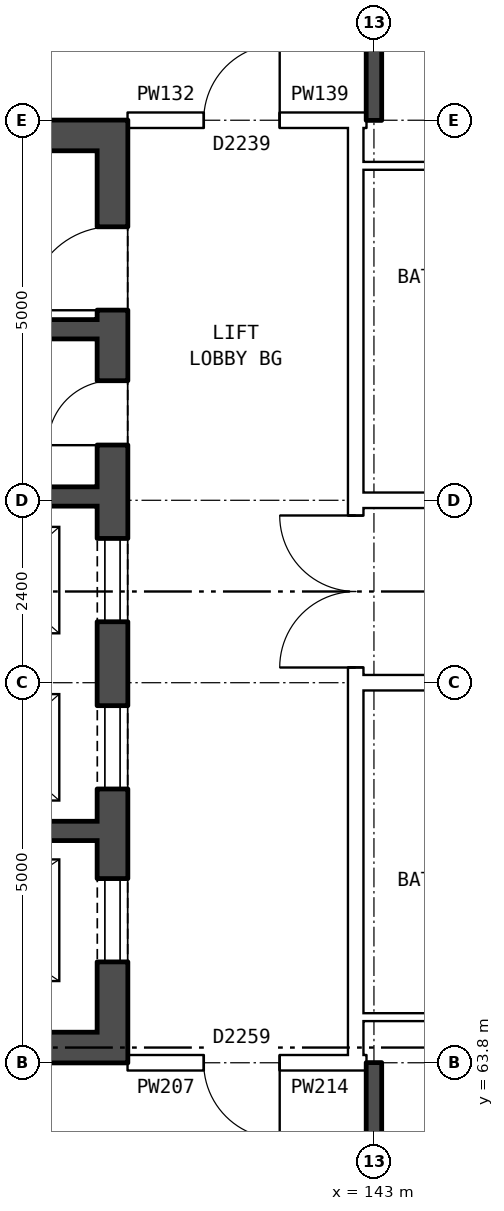
"""IFC4 building model, lengths in metres.
Left out: names, types, materials, properties, quantities, classifications, styles, units other than length and angle.
Written with IfcOpenShell. Run it as: python <this file> out.ifc"""

import sys

from ifc_helpers import new_model, si_unit, direction, frame, frame_2d, origin, place, context, subcontext, project, spatial, rectangle, extrude, element, fill, save


model = new_model("IFC4")
c1 = context("Model", 3, precision=1e-05, world=origin(), true_north=direction((0.0, 1.0)))
c2 = subcontext(c1, "Body", "Model", "MODEL_VIEW")
j1 = project(units=[si_unit("LENGTHUNIT", "METRE"), si_unit("PLANEANGLEUNIT", "RADIAN")], contexts=[c1])
p1 = place(None, origin())
s1 = spatial("IfcSite", under=j1, at=p1, CompositionType="ELEMENT")
p2 = place(p1, origin())
s2 = spatial("IfcBuilding", under=s1, at=p2, CompositionType="ELEMENT")
p3 = place(p2, frame((0.0, 0.0, 209.0)))
s3 = spatial("IfcBuildingStorey", under=s2, at=p3, CompositionType="ELEMENT", Elevation=209.0)
p4 = place(p3, frame((139.56, 63.8, 0.0), z_axis=(0.0, 0.0, 1.0), x_axis=(0.0, 1.0, 0.0)))
e1 = element("IfcWall", 1, at=p4, inside=s3, PredefinedType="SHEAR", context=c2, shape_type="SweptSolid", body=[
    extrude(rectangle(XDim=12.4, YDim=0.4, at=frame_2d((6.2, 0.0))), origin(), (0.0, 0.0, 1.0), 2.85),
])
p5 = place(p4, frame((1.325, 0.0, 0.0)))
e2 = element("IfcOpeningElement", 2, at=p5, cuts=e1, PredefinedType="OPENING", context=c2, shape_type="SweptSolid", body=[
    extrude(rectangle(XDim=1.1, YDim=2.1, at=frame_2d((0.55, 1.05))), frame((0.0, 0.21, 0.0), z_axis=(0.0, -1.0, 0.0), x_axis=(1.0, 0.0, 0.0)), (0.0, 0.0, 1.0), 0.42),
])
p6 = place(p4, frame((3.6, 0.0, 0.0)))
e3 = element("IfcOpeningElement", 3, at=p6, cuts=e1, PredefinedType="OPENING", context=c2, shape_type="SweptSolid", body=[
    extrude(rectangle(XDim=1.1, YDim=2.1, at=frame_2d((0.55, 1.05))), frame((0.0, 0.21, 0.0), z_axis=(0.0, -1.0, 0.0), x_axis=(1.0, 0.0, 0.0)), (0.0, 0.0, 1.0), 0.42),
])
p7 = place(p4, frame((5.8, 0.0, 0.0)))
e4 = element("IfcOpeningElement", 4, at=p7, cuts=e1, PredefinedType="OPENING", context=c2, shape_type="SweptSolid", body=[
    extrude(rectangle(XDim=1.1, YDim=2.1, at=frame_2d((0.55, 1.05))), frame((0.0, 0.21, 0.0), z_axis=(0.0, -1.0, 0.0), x_axis=(1.0, 0.0, 0.0)), (0.0, 0.0, 1.0), 0.42),
])
p8 = place(p4, frame((9.9, 0.0, 0.0)))
e5 = element("IfcOpeningElement", 5, at=p8, cuts=e1, PredefinedType="OPENING", context=c2, shape_type="SweptSolid", body=[
    extrude(rectangle(XDim=1.1, YDim=2.1, at=frame_2d((0.55, 1.05))), frame((0.0, 0.21, 0.0), z_axis=(0.0, -1.0, 0.0), x_axis=(1.0, 0.0, 0.0)), (0.0, 0.0, 1.0), 0.42),
])
p9 = place(p4, frame((8.125, 0.0, 0.0)))
e6 = element("IfcOpeningElement", 6, at=p9, cuts=e1, PredefinedType="OPENING", context=c2, shape_type="SweptSolid", body=[
    extrude(rectangle(XDim=0.85, YDim=2.1, at=frame_2d((0.425, 1.05))), frame((0.0, 0.21, 0.0), z_axis=(0.0, -1.0, 0.0), x_axis=(1.0, 0.0, 0.0)), (0.0, 0.0, 1.0), 0.42),
])
for number, where, z_axis, x_axis in (
    (7, (139.36, 64.0, 0.0), (0.0, 0.0, 1.0), (-1.0, 0.0, 0.0)),
    (8, (139.36, 76.0, 0.0), (0.0, 0.0, 1.0), (-1.0, 0.0, 0.0)),
):
    element("IfcWall", number, at=place(p3, frame(where, z_axis=z_axis, x_axis=x_axis)), inside=s3, PredefinedType="SHEAR", context=c2, shape_type="SweptSolid", body=[
        extrude(rectangle(XDim=7.6, YDim=0.4, at=frame_2d((3.8, 0.0))), origin(), (0.0, 0.0, 1.0), 2.85),
    ])
p10 = place(p3, frame((139.36, 66.85, 0.0), z_axis=(0.0, 0.0, 1.0), x_axis=(-1.0, 0.0, 0.0)))
e9 = element("IfcWall", 9, at=p10, inside=s3, PredefinedType="SHEAR", context=c2, shape_type="SweptSolid", body=[
    extrude(rectangle(XDim=4.775, YDim=0.25, at=frame_2d((2.388, 0.0))), origin(), (0.0, 0.0, 1.0), 2.85),
])
p11 = place(p3, frame((139.36, 71.25, 0.0), z_axis=(0.0, 0.0, 1.0), x_axis=(-1.0, 0.0, 0.0)))
e10 = element("IfcWall", 10, at=p11, inside=s3, PredefinedType="SHEAR", context=c2, shape_type="SweptSolid", body=[
    extrude(rectangle(XDim=7.6, YDim=0.25, at=frame_2d((3.8, 0.0))), origin(), (0.0, 0.0, 1.0), 2.85),
])
p12 = place(p11, frame((5.175, 0.0, 0.0)))
e11 = element("IfcOpeningElement", 11, at=p12, cuts=e10, PredefinedType="OPENING", context=c2, shape_type="SweptSolid", body=[
    extrude(rectangle(XDim=1.1, YDim=2.1, at=frame_2d((0.55, 1.05))), frame((0.0, 0.135, 0.0), z_axis=(0.0, -1.0, 0.0), x_axis=(1.0, 0.0, 0.0)), (0.0, 0.0, 1.0), 0.27),
])
p13 = place(p11, frame((3.35, 0.0, 0.0)))
e12 = element("IfcOpeningElement", 12, at=p13, cuts=e10, PredefinedType="OPENING", context=c2, shape_type="SweptSolid", body=[
    extrude(rectangle(XDim=0.85, YDim=2.1, at=frame_2d((0.425, 1.05))), frame((0.0, 0.135, 0.0), z_axis=(0.0, -1.0, 0.0), x_axis=(1.0, 0.0, 0.0)), (0.0, 0.0, 1.0), 0.27),
])
p14 = place(p3, frame((139.36, 73.45, 0.0), z_axis=(0.0, 0.0, 1.0), x_axis=(-1.0, 0.0, 0.0)))
e13 = element("IfcWall", 13, at=p14, inside=s3, PredefinedType="SHEAR", context=c2, shape_type="SweptSolid", body=[
    extrude(rectangle(XDim=2.525, YDim=0.25, at=frame_2d((1.263, 0.0))), origin(), (0.0, 0.0, 1.0), 2.85),
])
p15 = place(p3, frame((142.76, 63.9, 0.0), z_axis=(0.0, 0.0, 1.0), x_axis=(0.0, 1.0, 0.0)))
e14 = element("IfcWall", 14, at=p15, inside=s3, PredefinedType="PARTITIONING", context=c2, shape_type="SweptSolid", body=[
    extrude(rectangle(XDim=12.2, YDim=0.2, at=frame_2d((6.1, 0.0))), origin(), (0.0, 0.0, 1.0), 2.85),
])
p16 = place(p15, frame((5.1, 0.0, 0.0)))
e15 = element("IfcOpeningElement", 15, at=p16, cuts=e14, PredefinedType="OPENING", context=c2, shape_type="SweptSolid", body=[
    extrude(rectangle(XDim=2.0, YDim=2.1, at=frame_2d((1.0, 1.05))), frame((0.0, 0.11, 0.0), z_axis=(0.0, -1.0, 0.0), x_axis=(1.0, 0.0, 0.0)), (0.0, 0.0, 1.0), 0.22),
])
p17 = place(p3, frame((139.76, 63.8, 0.0), z_axis=(0.0, 0.0, 1.0), x_axis=(1.0, 0.0, 0.0)))
e16 = element("IfcWall", 16, at=p17, inside=s3, PredefinedType="PARTITIONING", context=c2, shape_type="SweptSolid", body=[
    extrude(rectangle(XDim=3.0, YDim=0.2, at=frame_2d((1.5, 0.0))), origin(), (0.0, 0.0, 1.0), 2.85),
])
p18 = place(p17, frame((1.0, 0.0, 0.0)))
e17 = element("IfcOpeningElement", 17, at=p18, cuts=e16, PredefinedType="OPENING", context=c2, shape_type="SweptSolid", body=[
    extrude(rectangle(XDim=1.0, YDim=2.1, at=frame_2d((0.5, 1.05))), frame((0.0, 0.11, 0.0), z_axis=(0.0, -1.0, 0.0), x_axis=(1.0, 0.0, 0.0)), (0.0, 0.0, 1.0), 0.22),
])
p19 = place(p3, frame((142.76, 63.8, 0.0), z_axis=(0.0, 0.0, 1.0), x_axis=(1.0, 0.0, 0.0)))
e18 = element("IfcWall", 18, at=p19, inside=s3, PredefinedType="PARTITIONING", context=c2, shape_type="SweptSolid", body=[
    extrude(rectangle(XDim=0.14, YDim=0.2, at=frame_2d((0.07, 0.0))), origin(), (0.0, 0.0, 1.0), 2.85),
])
p20 = place(p3, frame((142.76, 64.4, 0.0), z_axis=(0.0, 0.0, 1.0), x_axis=(1.0, 0.0, 0.0)))
e19 = element("IfcWall", 19, at=p20, inside=s3, PredefinedType="PARTITIONING", context=c2, shape_type="SweptSolid", body=[
    extrude(rectangle(XDim=3.24, YDim=0.1, at=frame_2d((1.62, 0.0))), origin(), (0.0, 0.0, 1.0), 2.85),
])
p21 = place(p3, frame((142.76, 68.8, 0.0), z_axis=(0.0, 0.0, 1.0), x_axis=(1.0, 0.0, 0.0)))
e20 = element("IfcWall", 20, at=p21, inside=s3, PredefinedType="PARTITIONING", context=c2, shape_type="SweptSolid", body=[
    extrude(rectangle(XDim=14.48, YDim=0.2, at=frame_2d((7.24, 0.0))), origin(), (0.0, 0.0, 1.0), 2.85),
])
p22 = place(p21, frame((4.24, 0.0, 0.0)))
e21 = element("IfcOpeningElement", 21, at=p22, cuts=e20, PredefinedType="OPENING", context=c2, shape_type="SweptSolid", body=[
    extrude(rectangle(XDim=1.0, YDim=2.1, at=frame_2d((0.5, 1.05))), frame((0.0, 0.11, 0.0), z_axis=(0.0, -1.0, 0.0), x_axis=(1.0, 0.0, 0.0)), (0.0, 0.0, 1.0), 0.22),
])
p23 = place(p21, frame((7.24, 0.0, 0.0)))
e22 = element("IfcOpeningElement", 22, at=p23, cuts=e20, PredefinedType="OPENING", context=c2, shape_type="SweptSolid", body=[
    extrude(rectangle(XDim=1.0, YDim=2.1, at=frame_2d((0.5, 1.05))), frame((0.0, 0.11, 0.0), z_axis=(0.0, -1.0, 0.0), x_axis=(1.0, 0.0, 0.0)), (0.0, 0.0, 1.0), 0.22),
])
p24 = place(p3, frame((142.76, 71.2, 0.0), z_axis=(0.0, 0.0, 1.0), x_axis=(1.0, 0.0, 0.0)))
e23 = element("IfcWall", 23, at=p24, inside=s3, PredefinedType="PARTITIONING", context=c2, shape_type="SweptSolid", body=[
    extrude(rectangle(XDim=14.48, YDim=0.2, at=frame_2d((7.24, 0.0))), origin(), (0.0, 0.0, 1.0), 2.85),
])
p25 = place(p24, frame((4.24, 0.0, 0.0)))
e24 = element("IfcOpeningElement", 24, at=p25, cuts=e23, PredefinedType="OPENING", context=c2, shape_type="SweptSolid", body=[
    extrude(rectangle(XDim=1.0, YDim=2.1, at=frame_2d((0.5, 1.05))), frame((0.0, 0.11, 0.0), z_axis=(0.0, -1.0, 0.0), x_axis=(1.0, 0.0, 0.0)), (0.0, 0.0, 1.0), 0.22),
])
p26 = place(p24, frame((7.24, 0.0, 0.0)))
e25 = element("IfcOpeningElement", 25, at=p26, cuts=e23, PredefinedType="OPENING", context=c2, shape_type="SweptSolid", body=[
    extrude(rectangle(XDim=1.0, YDim=2.1, at=frame_2d((0.5, 1.05))), frame((0.0, 0.11, 0.0), z_axis=(0.0, -1.0, 0.0), x_axis=(1.0, 0.0, 0.0)), (0.0, 0.0, 1.0), 0.22),
])
p27 = place(p3, frame((142.76, 75.6, 0.0), z_axis=(0.0, 0.0, 1.0), x_axis=(1.0, 0.0, 0.0)))
e26 = element("IfcWall", 26, at=p27, inside=s3, PredefinedType="PARTITIONING", context=c2, shape_type="SweptSolid", body=[
    extrude(rectangle(XDim=3.24, YDim=0.1, at=frame_2d((1.62, 0.0))), origin(), (0.0, 0.0, 1.0), 2.85),
])
p28 = place(p3, frame((139.76, 76.2, 0.0), z_axis=(0.0, 0.0, 1.0), x_axis=(1.0, 0.0, 0.0)))
e27 = element("IfcWall", 27, at=p28, inside=s3, PredefinedType="PARTITIONING", context=c2, shape_type="SweptSolid", body=[
    extrude(rectangle(XDim=3.0, YDim=0.2, at=frame_2d((1.5, 0.0))), origin(), (0.0, 0.0, 1.0), 2.85),
])
p29 = place(p28, frame((1.0, 0.0, 0.0)))
e28 = element("IfcOpeningElement", 28, at=p29, cuts=e27, PredefinedType="OPENING", context=c2, shape_type="SweptSolid", body=[
    extrude(rectangle(XDim=1.0, YDim=2.1, at=frame_2d((0.5, 1.05))), frame((0.0, 0.11, 0.0), z_axis=(0.0, -1.0, 0.0), x_axis=(1.0, 0.0, 0.0)), (0.0, 0.0, 1.0), 0.22),
])
p30 = place(p3, frame((142.76, 76.2, 0.0), z_axis=(0.0, 0.0, 1.0), x_axis=(1.0, 0.0, 0.0)))
e29 = element("IfcWall", 29, at=p30, inside=s3, PredefinedType="PARTITIONING", context=c2, shape_type="SweptSolid", body=[
    extrude(rectangle(XDim=0.14, YDim=0.2, at=frame_2d((0.07, 0.0))), origin(), (0.0, 0.0, 1.0), 2.85),
])
for number, where, z_axis, x_axis in (
    (30, (143.0, 54.36, 0.0), (0.0, 0.0, 1.0), (0.0, 1.0, 0.0)),
    (31, (143.0, 76.2, 0.0), (0.0, 0.0, 1.0), (0.0, 1.0, 0.0)),
):
    element("IfcWall", number, at=place(p3, frame(where, z_axis=z_axis, x_axis=x_axis)), inside=s3, PredefinedType="SOLIDWALL", context=c2, shape_type="SweptSolid", body=[
        extrude(rectangle(XDim=9.44, YDim=0.2, at=frame_2d((4.72, 0.0))), origin(), (0.0, 0.0, 1.0), 2.85),
    ])
p31 = place(p5, origin())
e32 = element("IfcDoor", 32, at=p31, inside=s3, OperationType="DOUBLE_DOOR_SLIDING", PredefinedType="DOOR", context=c2, shape_type="SweptSolid", body=[
    extrude(rectangle(XDim=1.1, YDim=2.1, at=frame_2d((0.55, 1.05))), frame((0.0, 0.185, 0.0), z_axis=(0.0, -1.0, 0.0), x_axis=(1.0, 0.0, 0.0)), (0.0, 0.0, 1.0), 0.05),
])
fill(e2, e32)
p32 = place(p6, origin())
e33 = element("IfcDoor", 33, at=p32, inside=s3, OperationType="DOUBLE_DOOR_SLIDING", PredefinedType="DOOR", context=c2, shape_type="SweptSolid", body=[
    extrude(rectangle(XDim=1.1, YDim=2.1, at=frame_2d((0.55, 1.05))), frame((0.0, 0.185, 0.0), z_axis=(0.0, -1.0, 0.0), x_axis=(1.0, 0.0, 0.0)), (0.0, 0.0, 1.0), 0.05),
])
fill(e3, e33)
p33 = place(p7, origin())
e34 = element("IfcDoor", 34, at=p33, inside=s3, OperationType="DOUBLE_DOOR_SLIDING", PredefinedType="DOOR", context=c2, shape_type="SweptSolid", body=[
    extrude(rectangle(XDim=1.1, YDim=2.1, at=frame_2d((0.55, 1.05))), frame((0.0, 0.185, 0.0), z_axis=(0.0, -1.0, 0.0), x_axis=(1.0, 0.0, 0.0)), (0.0, 0.0, 1.0), 0.05),
])
fill(e4, e34)
p34 = place(p8, origin())
e35 = element("IfcDoor", 35, at=p34, inside=s3, OperationType="SINGLE_SWING_LEFT", PredefinedType="DOOR", context=c2, shape_type="SweptSolid", body=[
    extrude(rectangle(XDim=1.1, YDim=2.1, at=frame_2d((0.55, 1.05))), frame((0.0, 0.185, 0.0), z_axis=(0.0, -1.0, 0.0), x_axis=(1.0, 0.0, 0.0)), (0.0, 0.0, 1.0), 0.05),
])
fill(e5, e35)
p35 = place(p9, origin())
e36 = element("IfcDoor", 36, at=p35, inside=s3, OperationType="SINGLE_SWING_LEFT", PredefinedType="DOOR", context=c2, shape_type="SweptSolid", body=[
    extrude(rectangle(XDim=0.85, YDim=2.1, at=frame_2d((0.425, 1.05))), frame((0.0, 0.185, 0.0), z_axis=(0.0, -1.0, 0.0), x_axis=(1.0, 0.0, 0.0)), (0.0, 0.0, 1.0), 0.05),
])
fill(e6, e36)
p36 = place(p16, origin())
e37 = element("IfcDoor", 37, at=p36, inside=s3, OperationType="DOUBLE_DOOR_SINGLE_SWING", PredefinedType="DOOR", context=c2, shape_type="SweptSolid", body=[
    extrude(rectangle(XDim=2.0, YDim=2.1, at=frame_2d((1.0, 1.05))), frame((0.0, 0.025, 0.0), z_axis=(0.0, -1.0, 0.0), x_axis=(1.0, 0.0, 0.0)), (0.0, 0.0, 1.0), 0.05),
])
fill(e15, e37)
p37 = place(p18, frame((1.0, 0.0, 0.0), z_axis=(0.0, 0.0, 1.0), x_axis=(-1.0, 0.0, 0.0)))
e38 = element("IfcDoor", 38, at=p37, inside=s3, OperationType="SINGLE_SWING_LEFT", PredefinedType="DOOR", context=c2, shape_type="SweptSolid", body=[
    extrude(rectangle(XDim=1.0, YDim=2.1, at=frame_2d((0.5, 1.05))), frame((0.0, 0.025, 0.0), z_axis=(0.0, -1.0, 0.0), x_axis=(1.0, 0.0, 0.0)), (0.0, 0.0, 1.0), 0.05),
])
fill(e17, e38)
p38 = place(p29, origin())
e39 = element("IfcDoor", 39, at=p38, inside=s3, OperationType="SINGLE_SWING_RIGHT", PredefinedType="DOOR", context=c2, shape_type="SweptSolid", body=[
    extrude(rectangle(XDim=1.0, YDim=2.1, at=frame_2d((0.5, 1.05))), frame((0.0, 0.025, 0.0), z_axis=(0.0, -1.0, 0.0), x_axis=(1.0, 0.0, 0.0)), (0.0, 0.0, 1.0), 0.05),
])
fill(e28, e39)
save(model, sys.argv[1])
